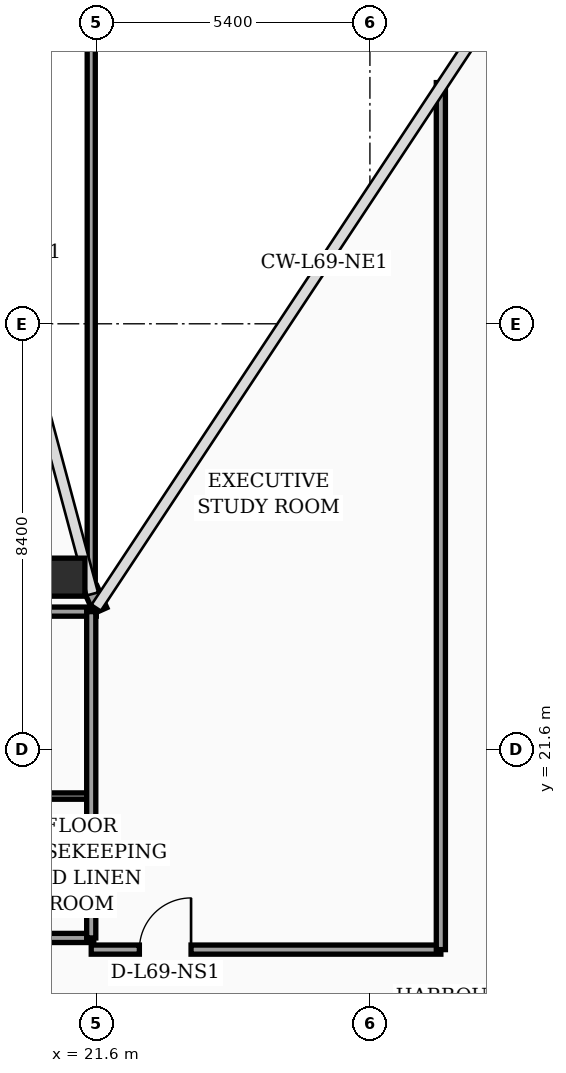
"""IFC4 building model, lengths in metres.
Left out: names, types, materials, properties, quantities, classifications, styles, units other than length and angle.
Written with IfcOpenShell. Run it as: python <this file> out.ifc"""

import sys

from ifc_helpers import new_model, si_unit, direction, frame, frame_2d, origin, origin_2d, place, context, subcontext, project, spatial, rectangle, hollow_rectangle, extrude, element, fill, save


model = new_model("IFC4")
c1 = context("Model", 3, precision=1e-05, world=origin(), true_north=direction((0.0, 1.0)))
c2 = subcontext(c1, "Body", "Model", "MODEL_VIEW")
j1 = project(units=[si_unit("LENGTHUNIT", "METRE"), si_unit("PLANEANGLEUNIT", "RADIAN")], contexts=[c1])
p1 = place(None, origin())
s1 = spatial("IfcSite", under=j1, at=p1, CompositionType="ELEMENT")
p2 = place(p1, origin())
s2 = spatial("IfcBuilding", under=s1, at=p2, CompositionType="ELEMENT")
p3 = place(p2, frame((0.0, 0.0, 278.7)))
s3 = spatial("IfcBuildingStorey", under=s2, at=p3, CompositionType="ELEMENT", Elevation=278.7)
p4 = place(p3, frame((21.0, 25.0, 0.0), z_axis=(0.0, 0.0, 1.0), x_axis=(1.0, 0.0, 0.0)))
e1 = element("IfcColumn", 1, at=p4, inside=s3, PredefinedType="COLUMN", context=c2, shape_type="SweptSolid", body=[
    extrude(hollow_rectangle(XDim=0.75, YDim=0.75, WallThickness=0.032, at=origin_2d()), origin(), (0.0, 0.0, 1.0), 3.52),
])
p5 = place(p3, frame((21.68, 24.34, 0.0), z_axis=(0.0, 0.0, 1.0), x_axis=(-0.40758134973, 0.913168901875, 0.0)))
e2 = element("IfcWall", 2, at=p5, inside=s3, PredefinedType="SOLIDWALL", context=c2, shape_type="SweptSolid", body=[
    extrude(rectangle(XDim=0.471, YDim=0.28, at=frame_2d((0.235, 0.0))), origin(), (0.0, 0.0, 1.0), 3.52),
])
p6 = place(p3, frame((17.25, 17.88, 0.0), z_axis=(0.0, 0.0, 1.0), x_axis=(1.0, 0.0, 0.0)))
e3 = element("IfcWall", 3, at=p6, inside=s3, PredefinedType="PARTITIONING", context=c2, shape_type="SweptSolid", body=[
    extrude(rectangle(XDim=4.3, YDim=0.18, at=frame_2d((2.15, 0.0))), origin(), (0.0, 0.0, 1.0), 3.52),
])
p7 = place(p3, frame((17.25, 20.68, 0.0), z_axis=(0.0, 0.0, 1.0), x_axis=(1.0, 0.0, 0.0)))
e4 = element("IfcWall", 4, at=p7, inside=s3, PredefinedType="PARTITIONING", context=c2, shape_type="SweptSolid", body=[
    extrude(rectangle(XDim=4.3, YDim=0.125, at=frame_2d((2.15, 0.0))), origin(), (0.0, 0.0, 1.0), 3.52),
])
p8 = place(p3, frame((17.25, 24.32, 0.0), z_axis=(0.0, 0.0, 1.0), x_axis=(1.0, 0.0, 0.0)))
e5 = element("IfcWall", 5, at=p8, inside=s3, PredefinedType="PARTITIONING", context=c2, shape_type="SweptSolid", body=[
    extrude(rectangle(XDim=4.35, YDim=0.18, at=frame_2d((2.175, 0.0))), origin(), (0.0, 0.0, 1.0), 3.52),
])
p9 = place(p3, frame((21.5, 17.88, 0.0), z_axis=(0.0, 0.0, 1.0), x_axis=(0.0, 1.0, 0.0)))
e6 = element("IfcWall", 6, at=p9, inside=s3, PredefinedType="PARTITIONING", context=c2, shape_type="SweptSolid", body=[
    extrude(rectangle(XDim=6.44, YDim=0.18, at=frame_2d((3.22, 0.0))), origin(), (0.0, 0.0, 1.0), 3.52),
])
p10 = place(p3, frame((21.5, 24.85, 0.0), z_axis=(0.0, 0.0, 1.0), x_axis=(0.0, 1.0, 0.0)))
e7 = element("IfcWall", 7, at=p10, inside=s3, PredefinedType="PARTITIONING", context=c2, shape_type="SweptSolid", body=[
    extrude(rectangle(XDim=13.05, YDim=0.16, at=frame_2d((6.525, 0.0))), origin(), (0.0, 0.0, 1.0), 2.97),
])
p11 = place(p3, frame((21.5, 17.65, 0.0), z_axis=(0.0, 0.0, 1.0), x_axis=(1.0, 0.0, 0.0)))
e8 = element("IfcWall", 8, at=p11, inside=s3, PredefinedType="PARTITIONING", context=c2, shape_type="SweptSolid", body=[
    extrude(rectangle(XDim=6.9, YDim=0.18, at=frame_2d((3.45, 0.0))), origin(), (0.0, 0.0, 1.0), 3.52),
])
p12 = place(p11, frame((0.95, 0.0, 0.0)))
e9 = element("IfcOpeningElement", 9, at=p12, cuts=e8, PredefinedType="OPENING", context=c2, shape_type="SweptSolid", body=[
    extrude(rectangle(XDim=1.02, YDim=2.2, at=frame_2d((0.51, 1.1))), frame((0.0, 0.1, 0.0), z_axis=(0.0, -1.0, 0.0), x_axis=(1.0, 0.0, 0.0)), (0.0, 0.0, 1.0), 0.2),
])
p13 = place(p3, frame((28.4, 17.65, 0.0), z_axis=(0.0, 0.0, 1.0), x_axis=(0.0, 1.0, 0.0)))
e10 = element("IfcWall", 10, at=p13, inside=s3, PredefinedType="PARTITIONING", context=c2, shape_type="SweptSolid", body=[
    extrude(rectangle(XDim=17.11, YDim=0.18, at=frame_2d((8.555, 0.0))), origin(), (0.0, 0.0, 1.0), 3.07),
])
p14 = place(p12, origin())
e11 = element("IfcDoor", 11, at=p14, inside=s3, OperationType="SINGLE_SWING_RIGHT", PredefinedType="DOOR", context=c2, shape_type="SweptSolid", body=[
    extrude(rectangle(XDim=1.02, YDim=2.2, at=frame_2d((0.51, 1.1))), frame((0.0, 0.025, 0.0), z_axis=(0.0, -1.0, 0.0), x_axis=(1.0, 0.0, 0.0)), (0.0, 0.0, 1.0), 0.05),
])
fill(e9, e11)
save(model, sys.argv[1])
